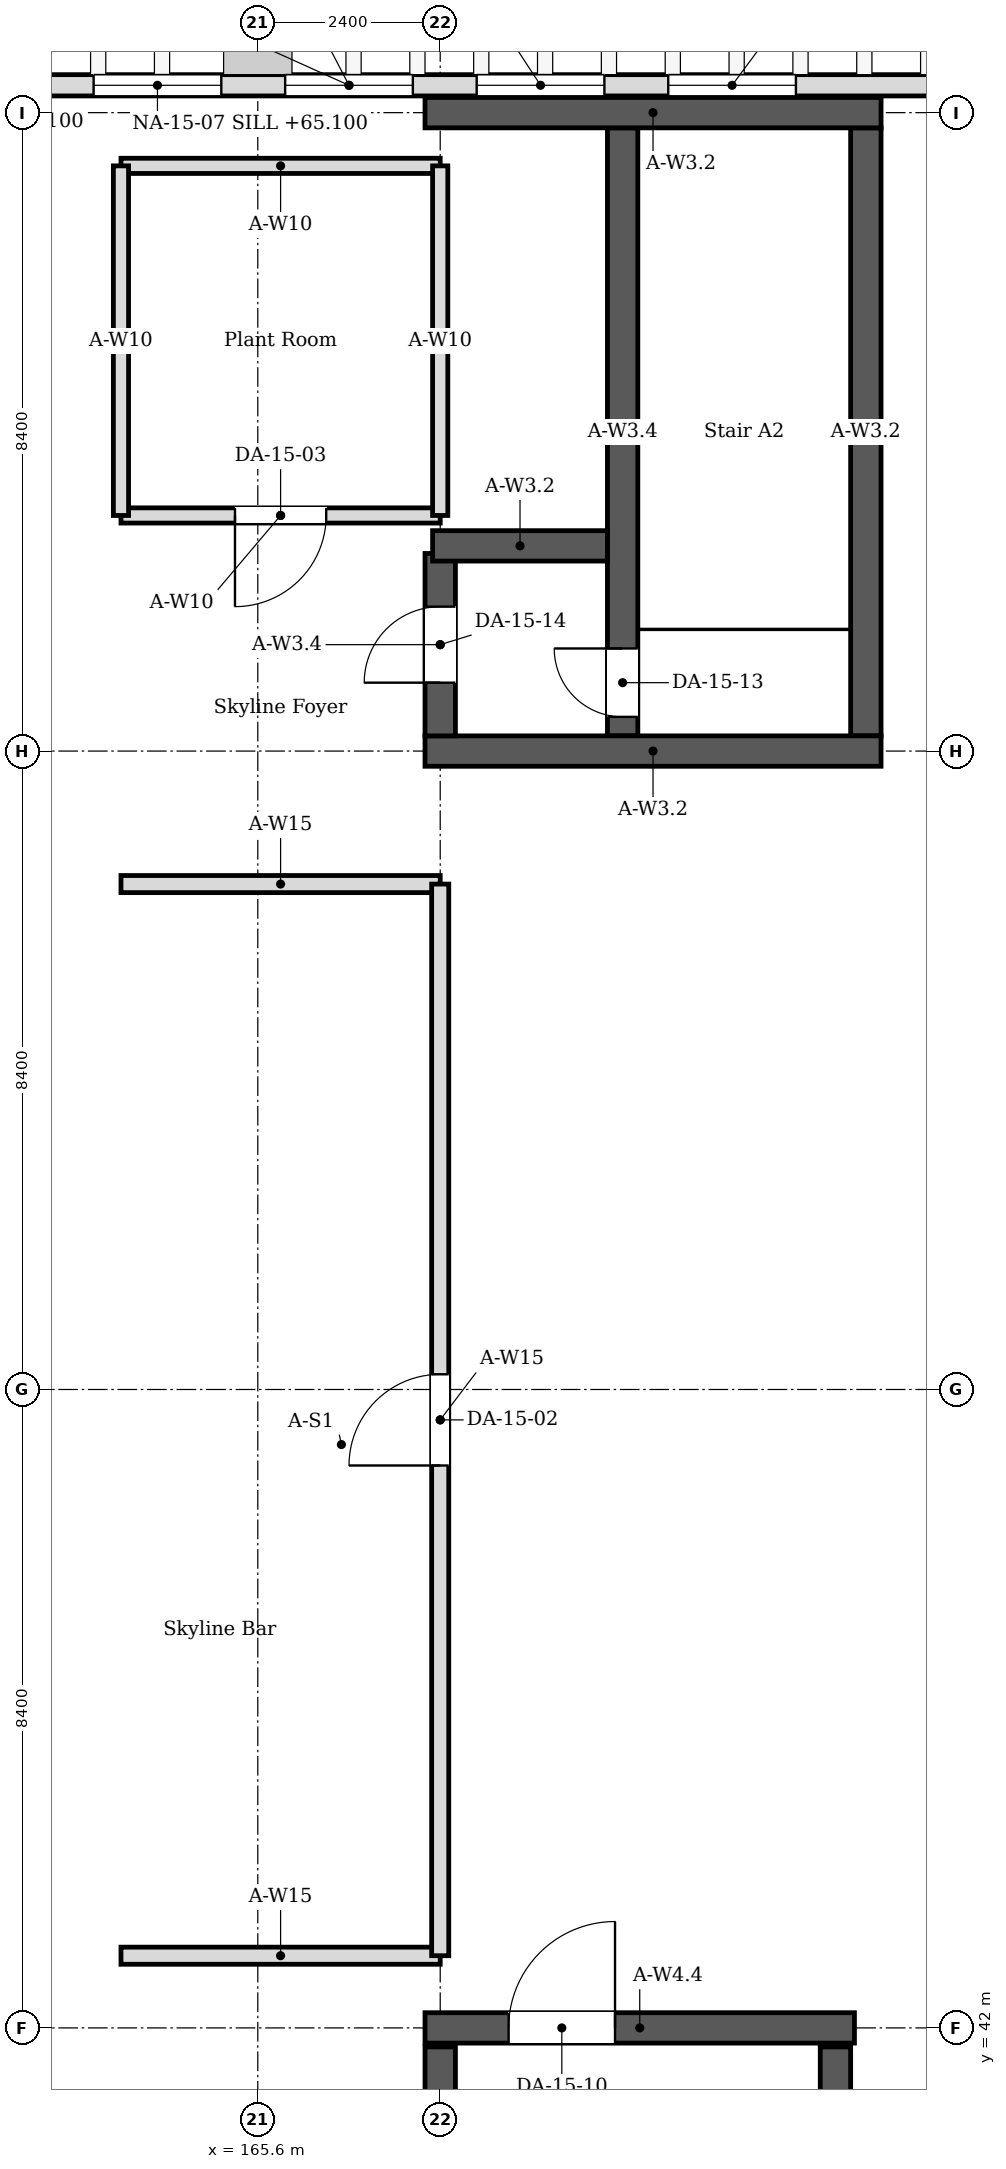
"""IFC4 building model, lengths in metres.
Left out: names, types, materials, properties, quantities, classifications, styles, units other than length and angle.
Written with IfcOpenShell. Run it as: python <this file> out.ifc"""

import sys

from ifc_helpers import new_model, si_unit, direction, frame, frame_2d, origin, place, context, subcontext, project, spatial, polyline, rectangle, outline, extrude, element, fill, save


model = new_model("IFC4")
c1 = context("Model", 3, precision=1e-05, world=origin(), true_north=direction((0.0, 1.0)))
c2 = subcontext(c1, "Body", "Model", "MODEL_VIEW")
j1 = project(units=[si_unit("LENGTHUNIT", "METRE"), si_unit("PLANEANGLEUNIT", "RADIAN")], contexts=[c1])
p1 = place(None, origin())
s1 = spatial("IfcSite", under=j1, at=p1, CompositionType="ELEMENT")
p2 = place(p1, origin())
s2 = spatial("IfcBuilding", under=s1, at=p2, CompositionType="ELEMENT")
p3 = place(p2, frame((0.0, 0.0, 64.8)))
s3 = spatial("IfcBuildingStorey", under=s2, at=p3, CompositionType="ELEMENT", Elevation=64.8)
p4 = place(p3, frame((157.0, 67.56, 0.0), z_axis=(0.0, 0.0, 1.0), x_axis=(1.0, 0.0, 0.0)))
e1 = element("IfcWall", 1, at=p4, inside=s3, PredefinedType="SOLIDWALL", context=c2, shape_type="SweptSolid", body=[
    extrude(outline(polyline([(0.0, 0.0), (19.6, 0.0), (19.6, 0.092), (17.967, 1.79), (16.333, 3.488), (14.7, 5.186), (13.067, 6.884), (11.433, 8.582), (9.8, 10.28), (8.167, 8.582), (6.533, 6.884), (4.9, 5.186), (3.267, 3.488), (1.633, 1.79), (0.0, 0.092), (0.0, 0.0)])), frame((0.0, 0.14, 0.0), z_axis=(0.0, -1.0, 0.0), x_axis=(1.0, 0.0, 0.0)), (0.0, 0.0, 1.0), 0.28),
])
p5 = place(p4, frame((3.92, 0.0, 0.3)))
e2 = element("IfcOpeningElement", 2, at=p5, cuts=e1, PredefinedType="OPENING", context=c2, shape_type="SweptSolid", body=[
    extrude(rectangle(XDim=1.68, YDim=3.5, at=frame_2d((0.84, 1.75))), frame((0.0, 0.15, 0.0), z_axis=(0.0, -1.0, 0.0), x_axis=(1.0, 0.0, 0.0)), (0.0, 0.0, 1.0), 0.3),
])
p6 = place(p4, frame((6.44, 0.0, 0.3)))
e3 = element("IfcOpeningElement", 3, at=p6, cuts=e1, PredefinedType="OPENING", context=c2, shape_type="SweptSolid", body=[
    extrude(rectangle(XDim=1.68, YDim=6.1, at=frame_2d((0.84, 3.05))), frame((0.0, 0.15, 0.0), z_axis=(0.0, -1.0, 0.0), x_axis=(1.0, 0.0, 0.0)), (0.0, 0.0, 1.0), 0.3),
])
p7 = place(p4, frame((8.96, 0.0, 0.3)))
e4 = element("IfcOpeningElement", 4, at=p7, cuts=e1, PredefinedType="OPENING", context=c2, shape_type="SweptSolid", body=[
    extrude(rectangle(XDim=1.68, YDim=8.8, at=frame_2d((0.84, 4.4))), frame((0.0, 0.15, 0.0), z_axis=(0.0, -1.0, 0.0), x_axis=(1.0, 0.0, 0.0)), (0.0, 0.0, 1.0), 0.3),
])
p8 = place(p4, frame((11.48, 0.0, 0.3)))
e5 = element("IfcOpeningElement", 5, at=p8, cuts=e1, PredefinedType="OPENING", context=c2, shape_type="SweptSolid", body=[
    extrude(rectangle(XDim=1.68, YDim=6.1, at=frame_2d((0.84, 3.05))), frame((0.0, 0.15, 0.0), z_axis=(0.0, -1.0, 0.0), x_axis=(1.0, 0.0, 0.0)), (0.0, 0.0, 1.0), 0.3),
])
p9 = place(p4, frame((14.0, 0.0, 0.3)))
e6 = element("IfcOpeningElement", 6, at=p9, cuts=e1, PredefinedType="OPENING", context=c2, shape_type="SweptSolid", body=[
    extrude(rectangle(XDim=1.68, YDim=3.5, at=frame_2d((0.84, 1.75))), frame((0.0, 0.15, 0.0), z_axis=(0.0, -1.0, 0.0), x_axis=(1.0, 0.0, 0.0)), (0.0, 0.0, 1.0), 0.3),
])
for number, where, z_axis, x_axis in (
    (7, (163.8, 57.05, 0.0), (0.0, 0.0, 1.0), (1.0, 0.0, 0.0)),
    (8, (163.8, 42.95, 0.0), (0.0, 0.0, 1.0), (1.0, 0.0, 0.0)),
):
    element("IfcWall", number, at=place(p3, frame(where, z_axis=z_axis, x_axis=x_axis)), inside=s3, PredefinedType="PARTITIONING", context=c2, shape_type="SweptSolid", body=[
        extrude(rectangle(XDim=4.2, YDim=0.225, at=frame_2d((2.1, 0.0))), origin(), (0.0, 0.0, 1.0), 6.14),
    ])
p10 = place(p3, frame((168.0, 42.95, 0.0), z_axis=(0.0, 0.0, 1.0), x_axis=(0.0, 1.0, 0.0)))
e9 = element("IfcWall", 9, at=p10, inside=s3, PredefinedType="PARTITIONING", context=c2, shape_type="SweptSolid", body=[
    extrude(rectangle(XDim=14.1, YDim=0.225, at=frame_2d((7.05, 0.0))), origin(), (0.0, 0.0, 1.0), 6.14),
])
p11 = place(p10, frame((6.45, 0.0, 0.0)))
e10 = element("IfcOpeningElement", 10, at=p11, cuts=e9, PredefinedType="OPENING", context=c2, shape_type="SweptSolid", body=[
    extrude(rectangle(XDim=1.2, YDim=2.1, at=frame_2d((0.6, 1.05))), frame((0.0, 0.123, 0.0), z_axis=(0.0, -1.0, 0.0), x_axis=(1.0, 0.0, 0.0)), (0.0, 0.0, 1.0), 0.245),
])
p12 = place(p3, frame((163.8, 61.9, 0.0), z_axis=(0.0, 0.0, 1.0), x_axis=(1.0, 0.0, 0.0)))
e11 = element("IfcWall", 11, at=p12, inside=s3, PredefinedType="PARTITIONING", context=c2, shape_type="SweptSolid", body=[
    extrude(rectangle(XDim=4.2, YDim=0.2, at=frame_2d((2.1, 0.0))), origin(), (0.0, 0.0, 1.0), 6.14),
])
p13 = place(p12, frame((1.5, 0.0, 0.0)))
e12 = element("IfcOpeningElement", 12, at=p13, cuts=e11, PredefinedType="OPENING", context=c2, shape_type="SweptSolid", body=[
    extrude(rectangle(XDim=1.2, YDim=2.1, at=frame_2d((0.6, 1.05))), frame((0.0, 0.11, 0.0), z_axis=(0.0, -1.0, 0.0), x_axis=(1.0, 0.0, 0.0)), (0.0, 0.0, 1.0), 0.22),
])
p14 = place(p3, frame((163.8, 66.5, 0.0), z_axis=(0.0, 0.0, 1.0), x_axis=(1.0, 0.0, 0.0)))
e13 = element("IfcWall", 13, at=p14, inside=s3, PredefinedType="PARTITIONING", context=c2, shape_type="SweptSolid", body=[
    extrude(rectangle(XDim=4.2, YDim=0.2, at=frame_2d((2.1, 0.0))), origin(), (0.0, 0.0, 1.0), 6.14),
])
for number, where, z_axis, x_axis in (
    (14, (163.8, 61.9, 0.0), (0.0, 0.0, 1.0), (0.0, 1.0, 0.0)),
    (15, (168.0, 61.9, 0.0), (0.0, 0.0, 1.0), (0.0, 1.0, 0.0)),
):
    element("IfcWall", number, at=place(p3, frame(where, z_axis=z_axis, x_axis=x_axis)), inside=s3, PredefinedType="PARTITIONING", context=c2, shape_type="SweptSolid", body=[
        extrude(rectangle(XDim=4.6, YDim=0.2, at=frame_2d((2.3, 0.0))), origin(), (0.0, 0.0, 1.0), 6.14),
    ])
p15 = place(p3, frame((167.8, 42.0, 0.0), z_axis=(0.0, 0.0, 1.0), x_axis=(1.0, 0.0, 0.0)))
e16 = element("IfcWall", 16, at=p15, inside=s3, PredefinedType="SOLIDWALL", context=c2, shape_type="SweptSolid", body=[
    extrude(rectangle(XDim=5.65, YDim=0.4, at=frame_2d((2.825, 0.0))), origin(), (0.0, 0.0, 1.0), 2.497),
])
p16 = place(p15, frame((1.1, 0.0, 0.0)))
e17 = element("IfcOpeningElement", 17, at=p16, cuts=e16, PredefinedType="OPENING", context=c2, shape_type="SweptSolid", body=[
    extrude(rectangle(XDim=1.4, YDim=2.1, at=frame_2d((0.7, 1.05))), frame((0.0, 0.21, 0.0), z_axis=(0.0, -1.0, 0.0), x_axis=(1.0, 0.0, 0.0)), (0.0, 0.0, 1.0), 0.42),
])
p17 = place(p3, frame((168.0, 25.45, 0.0), z_axis=(0.0, 0.0, 1.0), x_axis=(0.0, 1.0, 0.0)))
e18 = element("IfcWall", 18, at=p17, inside=s3, PredefinedType="SOLIDWALL", context=c2, shape_type="SweptSolid", body=[
    extrude(rectangle(XDim=16.3, YDim=0.4, at=frame_2d((8.15, 0.0))), origin(), (0.0, 0.0, 1.0), 4.324),
])
p18 = place(p3, frame((173.2, 25.45, 0.0), z_axis=(0.0, 0.0, 1.0), x_axis=(0.0, 1.0, 0.0)))
e19 = element("IfcWall", 19, at=p18, inside=s3, PredefinedType="SOLIDWALL", context=c2, shape_type="SweptSolid", body=[
    extrude(rectangle(XDim=16.3, YDim=0.4, at=frame_2d((8.15, 0.0))), origin(), (0.0, 0.0, 1.0), 2.497),
])
p19 = place(p3, frame((170.4, 59.0, 0.0), z_axis=(0.0, 0.0, 1.0), x_axis=(0.0, 1.0, 0.0)))
e20 = element("IfcWall", 20, at=p19, inside=s3, PredefinedType="SOLIDWALL", context=c2, shape_type="SweptSolid", body=[
    extrude(rectangle(XDim=8.0, YDim=0.4, at=frame_2d((4.0, 0.0))), origin(), (0.0, 0.0, 1.0), 5.2),
])
p20 = place(p19, frame((0.25, 0.0, 0.0)))
e21 = element("IfcOpeningElement", 21, at=p20, cuts=e20, PredefinedType="OPENING", context=c2, shape_type="SweptSolid", body=[
    extrude(rectangle(XDim=0.9, YDim=2.1, at=frame_2d((0.45, 1.05))), frame((0.0, 0.21, 0.0), z_axis=(0.0, -1.0, 0.0), x_axis=(1.0, 0.0, 0.0)), (0.0, 0.0, 1.0), 0.42),
])
p21 = place(p3, frame((173.6, 59.0, 0.0), z_axis=(0.0, 0.0, 1.0), x_axis=(0.0, 1.0, 0.0)))
e22 = element("IfcWall", 22, at=p21, inside=s3, PredefinedType="SOLIDWALL", context=c2, shape_type="SweptSolid", body=[
    extrude(rectangle(XDim=8.0, YDim=0.4, at=frame_2d((4.0, 0.0))), origin(), (0.0, 0.0, 1.0), 1.873),
])
for number, where, z_axis, x_axis in (
    (23, (167.8, 67.2, 0.0), (0.0, 0.0, 1.0), (1.0, 0.0, 0.0)),
    (24, (167.8, 58.8, 0.0), (0.0, 0.0, 1.0), (1.0, 0.0, 0.0)),
):
    element("IfcWall", number, at=place(p3, frame(where, z_axis=z_axis, x_axis=x_axis)), inside=s3, PredefinedType="SOLIDWALL", context=c2, shape_type="SweptSolid", body=[
        extrude(rectangle(XDim=6.0, YDim=0.4, at=frame_2d((3.0, 0.0))), origin(), (0.0, 0.0, 1.0), 1.873),
    ])
p22 = place(p3, frame((168.0, 59.0, 0.0), z_axis=(0.0, 0.0, 1.0), x_axis=(0.0, 1.0, 0.0)))
e25 = element("IfcWall", 25, at=p22, inside=s3, PredefinedType="SOLIDWALL", context=c2, shape_type="SweptSolid", body=[
    extrude(rectangle(XDim=2.4, YDim=0.4, at=frame_2d((1.2, 0.0))), origin(), (0.0, 0.0, 1.0), 5.2),
])
p23 = place(p22, frame((0.7, 0.0, 0.0)))
e26 = element("IfcOpeningElement", 26, at=p23, cuts=e25, PredefinedType="OPENING", context=c2, shape_type="SweptSolid", body=[
    extrude(rectangle(XDim=1.0, YDim=2.1, at=frame_2d((0.5, 1.05))), frame((0.0, 0.21, 0.0), z_axis=(0.0, -1.0, 0.0), x_axis=(1.0, 0.0, 0.0)), (0.0, 0.0, 1.0), 0.42),
])
p24 = place(p3, frame((167.9, 61.5, 0.0), z_axis=(0.0, 0.0, 1.0), x_axis=(1.0, 0.0, 0.0)))
e27 = element("IfcWall", 27, at=p24, inside=s3, PredefinedType="SOLIDWALL", context=c2, shape_type="SweptSolid", body=[
    extrude(rectangle(XDim=2.3, YDim=0.4, at=frame_2d((1.15, 0.0))), origin(), (0.0, 0.0, 1.0), 1.873),
])
p25 = place(p6, origin())
e28 = element("IfcWindow", 28, at=p25, inside=s3, PartitioningType="SINGLE_PANEL", PredefinedType="WINDOW", context=c2, shape_type="SweptSolid", body=[
    extrude(rectangle(XDim=1.68, YDim=6.1, at=frame_2d((0.84, 3.05))), frame((0.0, 0.03, 0.0), z_axis=(0.0, -1.0, 0.0), x_axis=(1.0, 0.0, 0.0)), (0.0, 0.0, 1.0), 0.06),
])
fill(e3, e28)
p26 = place(p7, origin())
e29 = element("IfcWindow", 29, at=p26, inside=s3, PartitioningType="SINGLE_PANEL", PredefinedType="WINDOW", context=c2, shape_type="SweptSolid", body=[
    extrude(rectangle(XDim=1.68, YDim=8.8, at=frame_2d((0.84, 4.4))), frame((0.0, 0.03, 0.0), z_axis=(0.0, -1.0, 0.0), x_axis=(1.0, 0.0, 0.0)), (0.0, 0.0, 1.0), 0.06),
])
fill(e4, e29)
p27 = place(p8, origin())
e30 = element("IfcWindow", 30, at=p27, inside=s3, PartitioningType="SINGLE_PANEL", PredefinedType="WINDOW", context=c2, shape_type="SweptSolid", body=[
    extrude(rectangle(XDim=1.68, YDim=6.1, at=frame_2d((0.84, 3.05))), frame((0.0, 0.03, 0.0), z_axis=(0.0, -1.0, 0.0), x_axis=(1.0, 0.0, 0.0)), (0.0, 0.0, 1.0), 0.06),
])
fill(e5, e30)
p28 = place(p9, origin())
e31 = element("IfcWindow", 31, at=p28, inside=s3, PartitioningType="SINGLE_PANEL", PredefinedType="WINDOW", context=c2, shape_type="SweptSolid", body=[
    extrude(rectangle(XDim=1.68, YDim=3.5, at=frame_2d((0.84, 1.75))), frame((0.0, 0.03, 0.0), z_axis=(0.0, -1.0, 0.0), x_axis=(1.0, 0.0, 0.0)), (0.0, 0.0, 1.0), 0.06),
])
fill(e6, e31)
p29 = place(p11, origin())
e32 = element("IfcDoor", 32, at=p29, inside=s3, OperationType="SINGLE_SWING_LEFT", PredefinedType="DOOR", context=c2, shape_type="SweptSolid", body=[
    extrude(rectangle(XDim=1.2, YDim=2.1, at=frame_2d((0.6, 1.05))), frame((0.0, 0.025, 0.0), z_axis=(0.0, -1.0, 0.0), x_axis=(1.0, 0.0, 0.0)), (0.0, 0.0, 1.0), 0.05),
])
fill(e10, e32)
p30 = place(p13, origin())
e33 = element("IfcDoor", 33, at=p30, inside=s3, OperationType="SINGLE_SWING_LEFT", PredefinedType="DOOR", context=c2, shape_type="SweptSolid", body=[
    extrude(rectangle(XDim=1.2, YDim=2.1, at=frame_2d((0.6, 1.05))), frame((0.0, 0.025, 0.0), z_axis=(0.0, -1.0, 0.0), x_axis=(1.0, 0.0, 0.0)), (0.0, 0.0, 1.0), 0.05),
])
fill(e12, e33)
p31 = place(p16, origin())
e34 = element("IfcDoor", 34, at=p31, inside=s3, OperationType="DOUBLE_DOOR_DOUBLE_SWING", PredefinedType="DOOR", context=c2, shape_type="SweptSolid", body=[
    extrude(rectangle(XDim=1.4, YDim=2.1, at=frame_2d((0.7, 1.05))), frame((0.0, 0.025, 0.0), z_axis=(0.0, -1.0, 0.0), x_axis=(1.0, 0.0, 0.0)), (0.0, 0.0, 1.0), 0.05),
])
fill(e17, e34)
p32 = place(p20, origin())
e35 = element("IfcDoor", 35, at=p32, inside=s3, OperationType="SINGLE_SWING_RIGHT", PredefinedType="DOOR", context=c2, shape_type="SweptSolid", body=[
    extrude(rectangle(XDim=0.9, YDim=2.1, at=frame_2d((0.45, 1.05))), frame((0.0, 0.025, 0.0), z_axis=(0.0, -1.0, 0.0), x_axis=(1.0, 0.0, 0.0)), (0.0, 0.0, 1.0), 0.05),
])
fill(e21, e35)
p33 = place(p23, origin())
e36 = element("IfcDoor", 36, at=p33, inside=s3, OperationType="SINGLE_SWING_LEFT", PredefinedType="DOOR", context=c2, shape_type="SweptSolid", body=[
    extrude(rectangle(XDim=1.0, YDim=2.1, at=frame_2d((0.5, 1.05))), frame((0.0, 0.025, 0.0), z_axis=(0.0, -1.0, 0.0), x_axis=(1.0, 0.0, 0.0)), (0.0, 0.0, 1.0), 0.05),
])
fill(e26, e36)
save(model, sys.argv[1])
